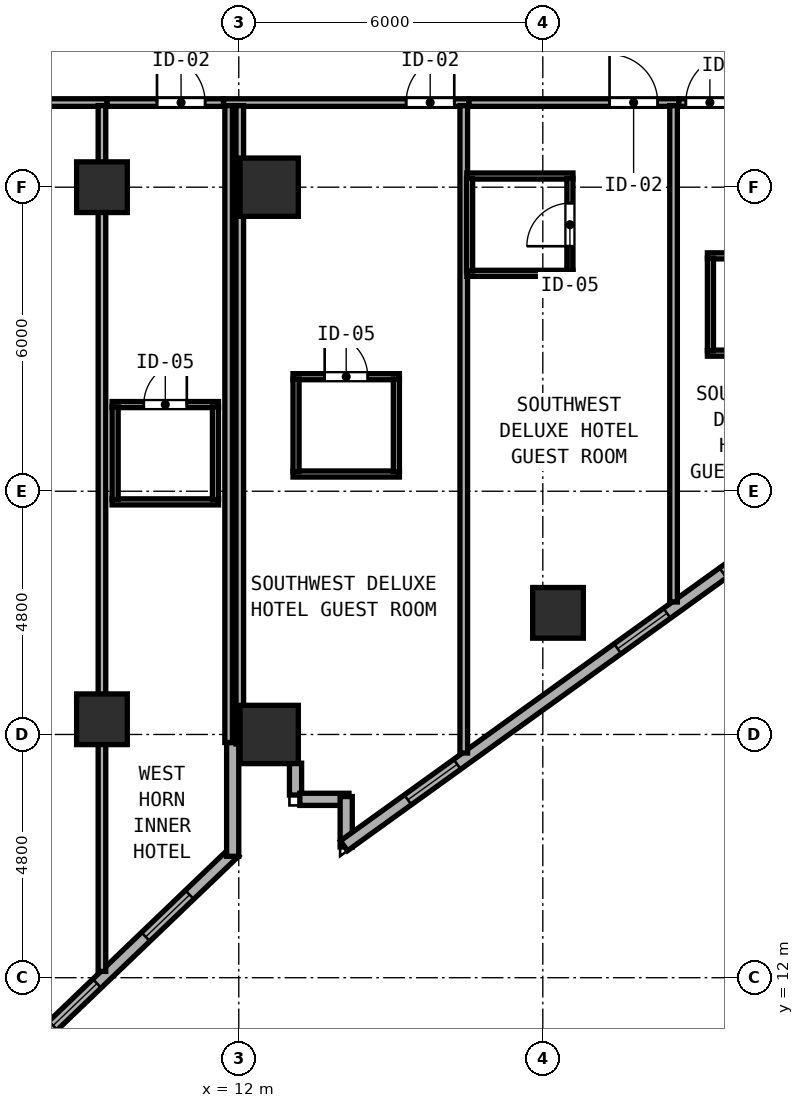
"""IFC4 building model, lengths in metres.
Left out: names, types, materials, properties, quantities, classifications, styles, units other than length and angle.
Written with IfcOpenShell. Run it as: python <this file> out.ifc"""

import sys

from ifc_helpers import new_model, si_unit, direction, frame, frame_2d, origin, origin_2d, place, context, subcontext, project, spatial, rectangle, hollow_rectangle, extrude, element, fill, save


model = new_model("IFC4")
c1 = context("Model", 3, precision=1e-05, world=origin(), true_north=direction((0.0, 1.0)))
c2 = subcontext(c1, "Body", "Model", "MODEL_VIEW")
j1 = project(units=[si_unit("LENGTHUNIT", "METRE"), si_unit("PLANEANGLEUNIT", "RADIAN")], contexts=[c1])
p1 = place(None, origin())
s1 = spatial("IfcSite", under=j1, at=p1, CompositionType="ELEMENT")
p2 = place(p1, origin())
s2 = spatial("IfcBuilding", under=s1, at=p2, CompositionType="ELEMENT")
p3 = place(p2, frame((0.0, 0.0, 55.2)))
s3 = spatial("IfcBuildingStorey", under=s2, at=p3, CompositionType="ELEMENT", Elevation=55.2)
for number, where, z_axis, x_axis in (
    (1, (12.6, 16.8, 0.0), (0.0, 0.0, 1.0), (1.0, 0.0, 0.0)),
    (2, (12.6, 27.6, 0.0), (0.0, 0.0, 1.0), (1.0, 0.0, 0.0)),
):
    element("IfcColumn", number, at=place(p3, frame(where, z_axis=z_axis, x_axis=x_axis)), inside=s3, PredefinedType="COLUMN", context=c2, shape_type="SweptSolid", body=[
        extrude(hollow_rectangle(XDim=1.15, YDim=1.15, WallThickness=0.042, at=origin_2d()), origin(), (0.0, 0.0, 1.0), 3.8),
    ])
for number, where, z_axis, x_axis in (
    (3, (18.3, 19.2, 0.0), (0.0, 0.0, 1.0), (1.0, 0.0, 0.0)),
    (4, (9.3, 17.1, 0.0), (0.0, 0.0, 1.0), (1.0, 0.0, 0.0)),
    (5, (9.3, 27.6, 0.0), (0.0, 0.0, 1.0), (1.0, 0.0, 0.0)),
):
    element("IfcColumn", number, at=place(p3, frame(where, z_axis=z_axis, x_axis=x_axis)), inside=s3, PredefinedType="COLUMN", context=c2, shape_type="SweptSolid", body=[
        extrude(hollow_rectangle(XDim=1.0, YDim=1.0, WallThickness=0.038, at=origin_2d()), origin(), (0.0, 0.0, 1.0), 3.8),
    ])
p4 = place(p3, frame((3.708, 6.621, 0.0), z_axis=(0.0, 0.0, 1.0), x_axis=(0.722047630521, 0.691843348786, 0.0)))
e6 = element("IfcWall", 6, at=p4, inside=s3, PredefinedType="SOLIDWALL", context=c2, shape_type="SweptSolid", body=[
    extrude(rectangle(XDim=11.373, YDim=0.24, at=frame_2d((5.687, 0.0))), origin(), (0.0, 0.0, 1.0), 3.6),
])
p5 = place(p4, frame((1.6, 0.0, 0.85)))
e7 = element("IfcOpeningElement", 7, at=p5, cuts=e6, PredefinedType="OPENING", context=c2, shape_type="SweptSolid", body=[
    extrude(rectangle(XDim=1.2, YDim=1.85, at=frame_2d((0.6, 0.925))), frame((0.0, 0.13, 0.0), z_axis=(0.0, -1.0, 0.0), x_axis=(1.0, 0.0, 0.0)), (0.0, 0.0, 1.0), 0.26),
])
p6 = place(p4, frame((6.41, 0.0, 0.85)))
e8 = element("IfcOpeningElement", 8, at=p6, cuts=e6, PredefinedType="OPENING", context=c2, shape_type="SweptSolid", body=[
    extrude(rectangle(XDim=1.2, YDim=1.85, at=frame_2d((0.6, 0.925))), frame((0.0, 0.13, 0.0), z_axis=(0.0, -1.0, 0.0), x_axis=(1.0, 0.0, 0.0)), (0.0, 0.0, 1.0), 0.26),
])
p7 = place(p4, frame((8.94, 0.0, 0.85)))
e9 = element("IfcOpeningElement", 9, at=p7, cuts=e6, PredefinedType="OPENING", context=c2, shape_type="SweptSolid", body=[
    extrude(rectangle(XDim=1.2, YDim=1.85, at=frame_2d((0.6, 0.925))), frame((0.0, 0.13, 0.0), z_axis=(0.0, -1.0, 0.0), x_axis=(1.0, 0.0, 0.0)), (0.0, 0.0, 1.0), 0.26),
])
p8 = place(p3, frame((11.88, 14.396, 0.0), z_axis=(0.0, 0.0, 1.0), x_axis=(0.0, 1.0, 0.0)))
e10 = element("IfcWall", 10, at=p8, inside=s3, PredefinedType="SOLIDWALL", context=c2, shape_type="SweptSolid", body=[
    extrude(rectangle(XDim=2.244, YDim=0.24, at=frame_2d((1.122, 0.0))), origin(), (0.0, 0.0, 1.0), 3.6),
])
p9 = place(p3, frame((13.12, 16.233, 0.0), z_axis=(0.0, 0.0, 1.0), x_axis=(0.0, -1.0, 0.0)))
e11 = element("IfcWall", 11, at=p9, inside=s3, PredefinedType="SOLIDWALL", context=c2, shape_type="SweptSolid", body=[
    extrude(rectangle(XDim=0.628, YDim=0.24, at=frame_2d((0.314, 0.0))), origin(), (0.0, 0.0, 1.0), 3.6),
])
p10 = place(p3, frame((13.205, 15.52, 0.0), z_axis=(0.0, 0.0, 1.0), x_axis=(1.0, 0.0, 0.0)))
e12 = element("IfcWall", 12, at=p10, inside=s3, PredefinedType="SOLIDWALL", context=c2, shape_type="SweptSolid", body=[
    extrude(rectangle(XDim=0.97, YDim=0.24, at=frame_2d((0.485, 0.0))), origin(), (0.0, 0.0, 1.0), 3.6),
])
p11 = place(p3, frame((14.12, 15.575, 0.0), z_axis=(0.0, 0.0, 1.0), x_axis=(0.0, -1.0, 0.0)))
e13 = element("IfcWall", 13, at=p11, inside=s3, PredefinedType="SOLIDWALL", context=c2, shape_type="SweptSolid", body=[
    extrude(rectangle(XDim=0.996, YDim=0.24, at=frame_2d((0.498, 0.0))), origin(), (0.0, 0.0, 1.0), 3.6),
])
p12 = place(p3, frame((14.075, 14.602, 0.0), z_axis=(0.0, 0.0, 1.0), x_axis=(0.811543176492, 0.58429245476, 0.0)))
e14 = element("IfcWall", 14, at=p12, inside=s3, PredefinedType="SOLIDWALL", context=c2, shape_type="SweptSolid", body=[
    extrude(rectangle(XDim=11.531, YDim=0.24, at=frame_2d((5.765, 0.0))), origin(), (0.0, 0.0, 1.0), 3.097),
])
p13 = place(p12, frame((1.554, 0.0, 0.85)))
e15 = element("IfcOpeningElement", 15, at=p13, cuts=e14, PredefinedType="OPENING", context=c2, shape_type="SweptSolid", body=[
    extrude(rectangle(XDim=1.2, YDim=1.85, at=frame_2d((0.6, 0.925))), frame((0.0, 0.13, 0.0), z_axis=(0.0, -1.0, 0.0), x_axis=(1.0, 0.0, 0.0)), (0.0, 0.0, 1.0), 0.26),
])
p14 = place(p12, frame((6.656, 0.0, 0.85)))
e16 = element("IfcOpeningElement", 16, at=p14, cuts=e14, PredefinedType="OPENING", context=c2, shape_type="SweptSolid", body=[
    extrude(rectangle(XDim=1.2, YDim=1.85, at=frame_2d((0.6, 0.925))), frame((0.0, 0.13, 0.0), z_axis=(0.0, -1.0, 0.0), x_axis=(1.0, 0.0, 0.0)), (0.0, 0.0, 1.0), 0.26),
])
p15 = place(p12, frame((9.218, 0.0, 0.85)))
e17 = element("IfcOpeningElement", 17, at=p15, cuts=e14, PredefinedType="OPENING", context=c2, shape_type="SweptSolid", body=[
    extrude(rectangle(XDim=1.2, YDim=1.85, at=frame_2d((0.6, 0.925))), frame((0.0, 0.13, 0.0), z_axis=(0.0, -1.0, 0.0), x_axis=(1.0, 0.0, 0.0)), (0.0, 0.0, 1.0), 0.26),
])
p16 = place(p3, frame((11.7, 29.27, 0.0), z_axis=(0.0, 0.0, 1.0), x_axis=(1.0, 0.0, 0.0)))
e18 = element("IfcWall", 18, at=p16, inside=s3, PredefinedType="PARTITIONING", context=c2, shape_type="SweptSolid", body=[
    extrude(rectangle(XDim=4.84, YDim=0.15, at=frame_2d((2.42, 0.0))), origin(), (0.0, 0.0, 1.0), 3.6),
])
p17 = place(p16, frame((4.552, 0.0, 0.0), z_axis=(0.0, 0.0, 1.0), x_axis=(-1.0, 0.0, 0.0)))
e19 = element("IfcOpeningElement", 19, at=p17, cuts=e18, PredefinedType="OPENING", context=c2, shape_type="SweptSolid", body=[
    extrude(rectangle(XDim=0.95, YDim=2.15, at=frame_2d((0.475, 1.075))), frame((0.0, 0.085, 0.0), z_axis=(0.0, -1.0, 0.0), x_axis=(1.0, 0.0, 0.0)), (0.0, 0.0, 1.0), 0.17),
])
p18 = place(p3, frame((11.8, 16.642, 0.0), z_axis=(0.0, 0.0, 1.0), x_axis=(0.0, 1.0, 0.0)))
e20 = element("IfcWall", 20, at=p18, inside=s3, PredefinedType="PARTITIONING", context=c2, shape_type="SweptSolid", body=[
    extrude(rectangle(XDim=12.568, YDim=0.15, at=frame_2d((6.284, 0.0))), origin(), (0.0, 0.0, 1.0), 3.6),
])
p19 = place(p3, frame((16.44, 16.434, 0.0), z_axis=(0.0, 0.0, 1.0), x_axis=(0.0, 1.0, 0.0)))
e21 = element("IfcWall", 21, at=p19, inside=s3, PredefinedType="PARTITIONING", context=c2, shape_type="SweptSolid", body=[
    extrude(rectangle(XDim=12.776, YDim=0.15, at=frame_2d((6.388, 0.0))), origin(), (0.0, 0.0, 1.0), 3.6),
])
p20 = place(p3, frame((13.07, 23.86, 0.0), z_axis=(0.0, 0.0, 1.0), x_axis=(1.0, 0.0, 0.0)))
e22 = element("IfcWall", 22, at=p20, inside=s3, PredefinedType="PARTITIONING", context=c2, shape_type="SweptSolid", body=[
    extrude(rectangle(XDim=2.1, YDim=0.12, at=frame_2d((1.05, 0.0))), origin(), (0.0, 0.0, 1.0), 3.6),
])
p21 = place(p20, frame((1.475, 0.0, 0.0), z_axis=(0.0, 0.0, 1.0), x_axis=(-1.0, 0.0, 0.0)))
e23 = element("IfcOpeningElement", 23, at=p21, cuts=e22, PredefinedType="OPENING", context=c2, shape_type="SweptSolid", body=[
    extrude(rectangle(XDim=0.85, YDim=2.1, at=frame_2d((0.425, 1.05))), frame((0.0, 0.07, 0.0), z_axis=(0.0, -1.0, 0.0), x_axis=(1.0, 0.0, 0.0)), (0.0, 0.0, 1.0), 0.14),
])
p22 = place(p3, frame((13.07, 21.94, 0.0), z_axis=(0.0, 0.0, 1.0), x_axis=(1.0, 0.0, 0.0)))
e24 = element("IfcWall", 24, at=p22, inside=s3, PredefinedType="PARTITIONING", context=c2, shape_type="SweptSolid", body=[
    extrude(rectangle(XDim=2.1, YDim=0.12, at=frame_2d((1.05, 0.0))), origin(), (0.0, 0.0, 1.0), 3.6),
])
for number, where, z_axis, x_axis in (
    (25, (13.13, 21.985, 0.0), (0.0, 0.0, 1.0), (0.0, 1.0, 0.0)),
    (26, (15.11, 21.985, 0.0), (0.0, 0.0, 1.0), (0.0, 1.0, 0.0)),
):
    element("IfcWall", number, at=place(p3, frame(where, z_axis=z_axis, x_axis=x_axis)), inside=s3, PredefinedType="PARTITIONING", context=c2, shape_type="SweptSolid", body=[
        extrude(rectangle(XDim=1.83, YDim=0.12, at=frame_2d((0.915, 0.0))), origin(), (0.0, 0.0, 1.0), 3.6),
    ])
p23 = place(p3, frame((16.542, 29.27, 0.0), z_axis=(0.0, 0.0, 1.0), x_axis=(1.0, 0.0, 0.0)))
e27 = element("IfcWall", 27, at=p23, inside=s3, PredefinedType="PARTITIONING", context=c2, shape_type="SweptSolid", body=[
    extrude(rectangle(XDim=4.138, YDim=0.15, at=frame_2d((2.069, 0.0))), origin(), (0.0, 0.0, 1.0), 3.6),
])
p24 = place(p23, frame((3.725, 0.0, 0.0), z_axis=(0.0, 0.0, 1.0), x_axis=(-1.0, 0.0, 0.0)))
e28 = element("IfcOpeningElement", 28, at=p24, cuts=e27, PredefinedType="OPENING", context=c2, shape_type="SweptSolid", body=[
    extrude(rectangle(XDim=0.95, YDim=2.15, at=frame_2d((0.475, 1.075))), frame((0.0, 0.085, 0.0), z_axis=(0.0, -1.0, 0.0), x_axis=(1.0, 0.0, 0.0)), (0.0, 0.0, 1.0), 0.17),
])
p25 = place(p3, frame((20.58, 19.415, 0.0), z_axis=(0.0, 0.0, 1.0), x_axis=(0.0, 1.0, 0.0)))
e29 = element("IfcWall", 29, at=p25, inside=s3, PredefinedType="PARTITIONING", context=c2, shape_type="SweptSolid", body=[
    extrude(rectangle(XDim=9.795, YDim=0.15, at=frame_2d((4.897, 0.0))), origin(), (0.0, 0.0, 1.0), 3.6),
])
p26 = place(p3, frame((16.5, 27.82, 0.0), z_axis=(0.0, 0.0, 1.0), x_axis=(1.0, 0.0, 0.0)))
e30 = element("IfcWall", 30, at=p26, inside=s3, PredefinedType="PARTITIONING", context=c2, shape_type="SweptSolid", body=[
    extrude(rectangle(XDim=2.095, YDim=0.12, at=frame_2d((1.047, 0.0))), origin(), (0.0, 0.0, 1.0), 3.097),
])
p27 = place(p3, frame((16.5, 25.9, 0.0), z_axis=(0.0, 0.0, 1.0), x_axis=(1.0, 0.0, 0.0)))
e31 = element("IfcWall", 31, at=p27, inside=s3, PredefinedType="PARTITIONING", context=c2, shape_type="SweptSolid", body=[
    extrude(rectangle(XDim=2.095, YDim=0.12, at=frame_2d((1.047, 0.0))), origin(), (0.0, 0.0, 1.0), 3.6),
])
p28 = place(p3, frame((16.555, 25.945, 0.0), z_axis=(0.0, 0.0, 1.0), x_axis=(0.0, 1.0, 0.0)))
e32 = element("IfcWall", 32, at=p28, inside=s3, PredefinedType="PARTITIONING", context=c2, shape_type="SweptSolid", body=[
    extrude(rectangle(XDim=1.83, YDim=0.12, at=frame_2d((0.915, 0.0))), origin(), (0.0, 0.0, 1.0), 3.6),
])
p29 = place(p3, frame((18.535, 25.945, 0.0), z_axis=(0.0, 0.0, 1.0), x_axis=(0.0, 1.0, 0.0)))
e33 = element("IfcWall", 33, at=p29, inside=s3, PredefinedType="PARTITIONING", context=c2, shape_type="SweptSolid", body=[
    extrude(rectangle(XDim=1.83, YDim=0.12, at=frame_2d((0.915, 0.0))), origin(), (0.0, 0.0, 1.0), 3.6),
])
p30 = place(p29, frame((0.49, 0.0, 0.0)))
e34 = element("IfcOpeningElement", 34, at=p30, cuts=e33, PredefinedType="OPENING", context=c2, shape_type="SweptSolid", body=[
    extrude(rectangle(XDim=0.85, YDim=2.1, at=frame_2d((0.425, 1.05))), frame((0.0, 0.07, 0.0), z_axis=(0.0, -1.0, 0.0), x_axis=(1.0, 0.0, 0.0)), (0.0, 0.0, 1.0), 0.14),
])
p31 = place(p3, frame((20.682, 29.27, 0.0), z_axis=(0.0, 0.0, 1.0), x_axis=(1.0, 0.0, 0.0)))
e35 = element("IfcWall", 35, at=p31, inside=s3, PredefinedType="PARTITIONING", context=c2, shape_type="SweptSolid", body=[
    extrude(rectangle(XDim=3.236, YDim=0.15, at=frame_2d((1.618, 0.0))), origin(), (0.0, 0.0, 1.0), 3.6),
])
p32 = place(p31, frame((1.09, 0.0, 0.0), z_axis=(0.0, 0.0, 1.0), x_axis=(-1.0, 0.0, 0.0)))
e36 = element("IfcOpeningElement", 36, at=p32, cuts=e35, PredefinedType="OPENING", context=c2, shape_type="SweptSolid", body=[
    extrude(rectangle(XDim=0.95, YDim=2.15, at=frame_2d((0.475, 1.075))), frame((0.0, 0.085, 0.0), z_axis=(0.0, -1.0, 0.0), x_axis=(1.0, 0.0, 0.0)), (0.0, 0.0, 1.0), 0.17),
])
p33 = place(p3, frame((21.248, 26.245, 0.0), z_axis=(0.0, 0.0, 1.0), x_axis=(1.0, 0.0, 0.0)))
e37 = element("IfcWall", 37, at=p33, inside=s3, PredefinedType="PARTITIONING", context=c2, shape_type="SweptSolid", body=[
    extrude(rectangle(XDim=2.1, YDim=0.12, at=frame_2d((1.05, 0.0))), origin(), (0.0, 0.0, 1.0), 3.6),
])
p34 = place(p33, frame((1.475, 0.0, 0.0), z_axis=(0.0, 0.0, 1.0), x_axis=(-1.0, 0.0, 0.0)))
e38 = element("IfcOpeningElement", 38, at=p34, cuts=e37, PredefinedType="OPENING", context=c2, shape_type="SweptSolid", body=[
    extrude(rectangle(XDim=0.85, YDim=2.1, at=frame_2d((0.425, 1.05))), frame((0.0, 0.07, 0.0), z_axis=(0.0, -1.0, 0.0), x_axis=(1.0, 0.0, 0.0)), (0.0, 0.0, 1.0), 0.14),
])
p35 = place(p3, frame((21.248, 24.325, 0.0), z_axis=(0.0, 0.0, 1.0), x_axis=(1.0, 0.0, 0.0)))
e39 = element("IfcWall", 39, at=p35, inside=s3, PredefinedType="PARTITIONING", context=c2, shape_type="SweptSolid", body=[
    extrude(rectangle(XDim=2.1, YDim=0.12, at=frame_2d((1.05, 0.0))), origin(), (0.0, 0.0, 1.0), 3.6),
])
p36 = place(p3, frame((21.308, 24.37, 0.0), z_axis=(0.0, 0.0, 1.0), x_axis=(0.0, 1.0, 0.0)))
e40 = element("IfcWall", 40, at=p36, inside=s3, PredefinedType="PARTITIONING", context=c2, shape_type="SweptSolid", body=[
    extrude(rectangle(XDim=1.83, YDim=0.12, at=frame_2d((0.915, 0.0))), origin(), (0.0, 0.0, 1.0), 3.6),
])
p37 = place(p3, frame((2.376, 29.27, 0.0), z_axis=(0.0, 0.0, 1.0), x_axis=(1.0, 0.0, 0.0)))
e41 = element("IfcWall", 41, at=p37, inside=s3, PredefinedType="PARTITIONING", context=c2, shape_type="SweptSolid", body=[
    extrude(rectangle(XDim=7.024, YDim=0.15, at=frame_2d((3.512, 0.0))), origin(), (0.0, 0.0, 1.0), 3.6),
])
p38 = place(p37, frame((5.727, 0.0, 0.0), z_axis=(0.0, 0.0, 1.0), x_axis=(-1.0, 0.0, 0.0)))
e42 = element("IfcOpeningElement", 42, at=p38, cuts=e41, PredefinedType="OPENING", context=c2, shape_type="SweptSolid", body=[
    extrude(rectangle(XDim=0.95, YDim=2.18, at=frame_2d((0.475, 1.09))), frame((0.0, 0.085, 0.0), z_axis=(0.0, -1.0, 0.0), x_axis=(1.0, 0.0, 0.0)), (0.0, 0.0, 1.0), 0.17),
])
p39 = place(p3, frame((9.3, 12.125, 0.0), z_axis=(0.0, 0.0, 1.0), x_axis=(0.0, 1.0, 0.0)))
e43 = element("IfcWall", 43, at=p39, inside=s3, PredefinedType="PARTITIONING", context=c2, shape_type="SweptSolid", body=[
    extrude(rectangle(XDim=17.085, YDim=0.15, at=frame_2d((8.543, 0.0))), origin(), (0.0, 0.0, 1.0), 3.6),
])
p40 = place(p3, frame((9.402, 29.27, 0.0), z_axis=(0.0, 0.0, 1.0), x_axis=(1.0, 0.0, 0.0)))
e44 = element("IfcWall", 44, at=p40, inside=s3, PredefinedType="PARTITIONING", context=c2, shape_type="SweptSolid", body=[
    extrude(rectangle(XDim=2.296, YDim=0.15, at=frame_2d((1.148, 0.0))), origin(), (0.0, 0.0, 1.0), 3.6),
])
p41 = place(p40, frame((1.934, 0.0, 0.0), z_axis=(0.0, 0.0, 1.0), x_axis=(-1.0, 0.0, 0.0)))
e45 = element("IfcOpeningElement", 45, at=p41, cuts=e44, PredefinedType="OPENING", context=c2, shape_type="SweptSolid", body=[
    extrude(rectangle(XDim=0.95, YDim=2.15, at=frame_2d((0.475, 1.075))), frame((0.0, 0.085, 0.0), z_axis=(0.0, -1.0, 0.0), x_axis=(1.0, 0.0, 0.0)), (0.0, 0.0, 1.0), 0.17),
])
p42 = place(p3, frame((12.02, 16.612, 0.0), z_axis=(0.0, 0.0, 1.0), x_axis=(0.0, 1.0, 0.0)))
e46 = element("IfcWall", 46, at=p42, inside=s3, PredefinedType="PARTITIONING", context=c2, shape_type="SweptSolid", body=[
    extrude(rectangle(XDim=12.598, YDim=0.15, at=frame_2d((6.299, 0.0))), origin(), (0.0, 0.0, 1.0), 3.6),
])
p43 = place(p3, frame((9.5, 23.31, 0.0), z_axis=(0.0, 0.0, 1.0), x_axis=(1.0, 0.0, 0.0)))
e47 = element("IfcWall", 47, at=p43, inside=s3, PredefinedType="PARTITIONING", context=c2, shape_type="SweptSolid", body=[
    extrude(rectangle(XDim=2.1, YDim=0.12, at=frame_2d((1.05, 0.0))), origin(), (0.0, 0.0, 1.0), 3.6),
])
p44 = place(p43, frame((1.475, 0.0, 0.0), z_axis=(0.0, 0.0, 1.0), x_axis=(-1.0, 0.0, 0.0)))
e48 = element("IfcOpeningElement", 48, at=p44, cuts=e47, PredefinedType="OPENING", context=c2, shape_type="SweptSolid", body=[
    extrude(rectangle(XDim=0.85, YDim=2.1, at=frame_2d((0.425, 1.05))), frame((0.0, 0.07, 0.0), z_axis=(0.0, -1.0, 0.0), x_axis=(1.0, 0.0, 0.0)), (0.0, 0.0, 1.0), 0.14),
])
p45 = place(p3, frame((9.5, 21.39, 0.0), z_axis=(0.0, 0.0, 1.0), x_axis=(1.0, 0.0, 0.0)))
e49 = element("IfcWall", 49, at=p45, inside=s3, PredefinedType="PARTITIONING", context=c2, shape_type="SweptSolid", body=[
    extrude(rectangle(XDim=2.1, YDim=0.12, at=frame_2d((1.05, 0.0))), origin(), (0.0, 0.0, 1.0), 3.6),
])
for number, where, z_axis, x_axis in (
    (50, (9.56, 21.435, 0.0), (0.0, 0.0, 1.0), (0.0, 1.0, 0.0)),
    (51, (11.54, 21.435, 0.0), (0.0, 0.0, 1.0), (0.0, 1.0, 0.0)),
):
    element("IfcWall", number, at=place(p3, frame(where, z_axis=z_axis, x_axis=x_axis)), inside=s3, PredefinedType="PARTITIONING", context=c2, shape_type="SweptSolid", body=[
        extrude(rectangle(XDim=1.83, YDim=0.12, at=frame_2d((0.915, 0.0))), origin(), (0.0, 0.0, 1.0), 3.6),
    ])
p46 = place(p6, origin())
e52 = element("IfcWindow", 52, at=p46, inside=s3, PartitioningType="SINGLE_PANEL", PredefinedType="WINDOW", context=c2, shape_type="SweptSolid", body=[
    extrude(rectangle(XDim=1.2, YDim=1.85, at=frame_2d((0.6, 0.925))), frame((0.0, 0.03, 0.0), z_axis=(0.0, -1.0, 0.0), x_axis=(1.0, 0.0, 0.0)), (0.0, 0.0, 1.0), 0.06),
])
fill(e8, e52)
p47 = place(p13, origin())
e53 = element("IfcWindow", 53, at=p47, inside=s3, PartitioningType="SINGLE_PANEL", PredefinedType="WINDOW", context=c2, shape_type="SweptSolid", body=[
    extrude(rectangle(XDim=1.2, YDim=1.85, at=frame_2d((0.6, 0.925))), frame((0.0, 0.03, 0.0), z_axis=(0.0, -1.0, 0.0), x_axis=(1.0, 0.0, 0.0)), (0.0, 0.0, 1.0), 0.06),
])
fill(e15, e53)
p48 = place(p14, origin())
e54 = element("IfcWindow", 54, at=p48, inside=s3, PartitioningType="SINGLE_PANEL", PredefinedType="WINDOW", context=c2, shape_type="SweptSolid", body=[
    extrude(rectangle(XDim=1.2, YDim=1.85, at=frame_2d((0.6, 0.925))), frame((0.0, 0.03, 0.0), z_axis=(0.0, -1.0, 0.0), x_axis=(1.0, 0.0, 0.0)), (0.0, 0.0, 1.0), 0.06),
])
fill(e16, e54)
p49 = place(p17, origin())
e55 = element("IfcDoor", 55, at=p49, inside=s3, OperationType="SINGLE_SWING_LEFT", PredefinedType="DOOR", context=c2, shape_type="SweptSolid", body=[
    extrude(rectangle(XDim=0.95, YDim=2.15, at=frame_2d((0.475, 1.075))), frame((0.0, 0.025, 0.0), z_axis=(0.0, -1.0, 0.0), x_axis=(1.0, 0.0, 0.0)), (0.0, 0.0, 1.0), 0.05),
])
fill(e19, e55)
p50 = place(p21, origin())
e56 = element("IfcDoor", 56, at=p50, inside=s3, OperationType="SINGLE_SWING_RIGHT", PredefinedType="DOOR", context=c2, shape_type="SweptSolid", body=[
    extrude(rectangle(XDim=0.85, YDim=2.1, at=frame_2d((0.425, 1.05))), frame((0.0, 0.025, 0.0), z_axis=(0.0, -1.0, 0.0), x_axis=(1.0, 0.0, 0.0)), (0.0, 0.0, 1.0), 0.05),
])
fill(e23, e56)
p51 = place(p24, origin())
e57 = element("IfcDoor", 57, at=p51, inside=s3, OperationType="SINGLE_SWING_RIGHT", PredefinedType="DOOR", context=c2, shape_type="SweptSolid", body=[
    extrude(rectangle(XDim=0.95, YDim=2.15, at=frame_2d((0.475, 1.075))), frame((0.0, 0.025, 0.0), z_axis=(0.0, -1.0, 0.0), x_axis=(1.0, 0.0, 0.0)), (0.0, 0.0, 1.0), 0.05),
])
fill(e28, e57)
p52 = place(p30, origin())
e58 = element("IfcDoor", 58, at=p52, inside=s3, OperationType="SINGLE_SWING_LEFT", PredefinedType="DOOR", context=c2, shape_type="SweptSolid", body=[
    extrude(rectangle(XDim=0.85, YDim=2.1, at=frame_2d((0.425, 1.05))), frame((0.0, 0.025, 0.0), z_axis=(0.0, -1.0, 0.0), x_axis=(1.0, 0.0, 0.0)), (0.0, 0.0, 1.0), 0.05),
])
fill(e34, e58)
p53 = place(p32, origin())
e59 = element("IfcDoor", 59, at=p53, inside=s3, OperationType="SINGLE_SWING_LEFT", PredefinedType="DOOR", context=c2, shape_type="SweptSolid", body=[
    extrude(rectangle(XDim=0.95, YDim=2.15, at=frame_2d((0.475, 1.075))), frame((0.0, 0.025, 0.0), z_axis=(0.0, -1.0, 0.0), x_axis=(1.0, 0.0, 0.0)), (0.0, 0.0, 1.0), 0.05),
])
fill(e36, e59)
p54 = place(p41, origin())
e60 = element("IfcDoor", 60, at=p54, inside=s3, OperationType="SINGLE_SWING_RIGHT", PredefinedType="DOOR", context=c2, shape_type="SweptSolid", body=[
    extrude(rectangle(XDim=0.95, YDim=2.15, at=frame_2d((0.475, 1.075))), frame((0.0, 0.025, 0.0), z_axis=(0.0, -1.0, 0.0), x_axis=(1.0, 0.0, 0.0)), (0.0, 0.0, 1.0), 0.05),
])
fill(e45, e60)
p55 = place(p44, origin())
e61 = element("IfcDoor", 61, at=p55, inside=s3, OperationType="SINGLE_SWING_LEFT", PredefinedType="DOOR", context=c2, shape_type="SweptSolid", body=[
    extrude(rectangle(XDim=0.85, YDim=2.1, at=frame_2d((0.425, 1.05))), frame((0.0, 0.025, 0.0), z_axis=(0.0, -1.0, 0.0), x_axis=(1.0, 0.0, 0.0)), (0.0, 0.0, 1.0), 0.05),
])
fill(e48, e61)
p56 = place(p15, origin())
e62 = element("IfcWindow", 62, at=p56, inside=s3, PartitioningType="SINGLE_PANEL", PredefinedType="WINDOW", context=c2, shape_type="SweptSolid", body=[
    extrude(rectangle(XDim=1.2, YDim=1.85, at=frame_2d((0.6, 0.925))), frame((0.0, 0.03, 0.0), z_axis=(0.0, -1.0, 0.0), x_axis=(1.0, 0.0, 0.0)), (0.0, 0.0, 1.0), 0.06),
])
fill(e17, e62)
p57 = place(p7, origin())
e63 = element("IfcWindow", 63, at=p57, inside=s3, PartitioningType="SINGLE_PANEL", PredefinedType="WINDOW", context=c2, shape_type="SweptSolid", body=[
    extrude(rectangle(XDim=1.2, YDim=1.85, at=frame_2d((0.6, 0.925))), frame((0.0, 0.03, 0.0), z_axis=(0.0, -1.0, 0.0), x_axis=(1.0, 0.0, 0.0)), (0.0, 0.0, 1.0), 0.06),
])
fill(e9, e63)
save(model, sys.argv[1])
